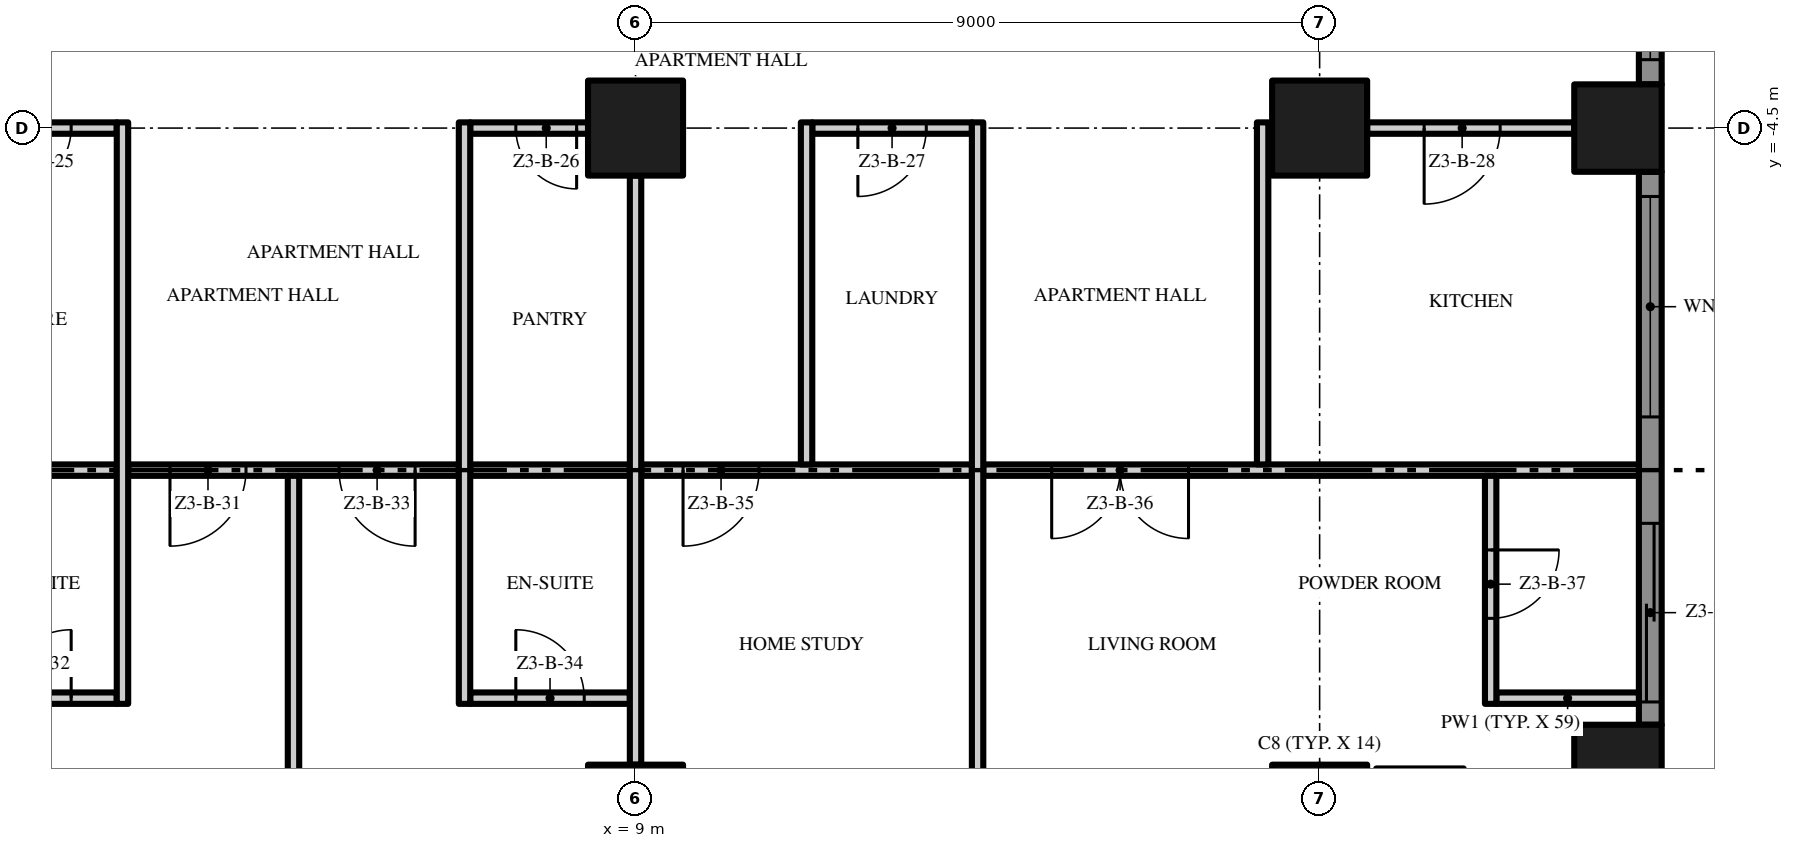
"""IFC4 building model, lengths in metres.
Left out: names, types, materials, properties, quantities, classifications, styles, units other than length and angle.
Written with IfcOpenShell. Run it as: python <this file> out.ifc"""

import sys

from ifc_helpers import new_model, si_unit, direction, frame, frame_2d, origin, origin_2d, place, context, subcontext, project, spatial, polyline, rectangle, outline, extrude, element, fill, save


model = new_model("IFC4")
c1 = context("Model", 3, precision=1e-05, world=origin(), true_north=direction((0.0, 1.0)))
c2 = subcontext(c1, "Body", "Model", "MODEL_VIEW")
j1 = project(units=[si_unit("LENGTHUNIT", "METRE"), si_unit("PLANEANGLEUNIT", "RADIAN")], contexts=[c1])
p1 = place(None, origin())
s1 = spatial("IfcSite", under=j1, at=p1, CompositionType="ELEMENT")
p2 = place(p1, origin())
s2 = spatial("IfcBuilding", under=s1, at=p2, CompositionType="ELEMENT")
p3 = place(p2, frame((0.0, 0.0, 144.0)))
s3 = spatial("IfcBuildingStorey", under=s2, at=p3, CompositionType="ELEMENT", Elevation=144.0)
for number, where, z_axis, x_axis in (
    (1, (18.0, -13.5, 0.0), (0.0, 0.0, 1.0), (1.0, 0.0, 0.0)),
    (2, (18.0, -4.5, 0.0), (0.0, 0.0, 1.0), (1.0, 0.0, 0.0)),
):
    element("IfcColumn", number, at=place(p3, frame(where, z_axis=z_axis, x_axis=x_axis)), inside=s3, PredefinedType="COLUMN", context=c2, shape_type="SweptSolid", body=[
        extrude(rectangle(XDim=1.25, YDim=1.25, at=origin_2d()), origin(), (0.0, 0.0, 1.0), 3.5),
    ])
for number, where, z_axis, x_axis in (
    (3, (21.925, -12.925, 0.0), (0.0, 0.0, 1.0), (1.0, 0.0, 0.0)),
    (4, (21.925, -4.5, 0.0), (0.0, 0.0, 1.0), (1.0, 0.0, 0.0)),
):
    element("IfcColumn", number, at=place(p3, frame(where, z_axis=z_axis, x_axis=x_axis)), inside=s3, PredefinedType="COLUMN", context=c2, shape_type="SweptSolid", body=[
        extrude(rectangle(XDim=1.15, YDim=1.15, at=origin_2d()), origin(), (0.0, 0.0, 1.0), 3.5),
    ])
for number, where, z_axis, x_axis in (
    (5, (9.0, -13.5, 0.0), (0.0, 0.0, 1.0), (1.0, 0.0, 0.0)),
    (6, (9.0, -4.5, 0.0), (0.0, 0.0, 1.0), (1.0, 0.0, 0.0)),
):
    element("IfcColumn", number, at=place(p3, frame(where, z_axis=z_axis, x_axis=x_axis)), inside=s3, PredefinedType="COLUMN", context=c2, shape_type="SweptSolid", body=[
        extrude(rectangle(XDim=1.25, YDim=1.25, at=origin_2d()), origin(), (0.0, 0.0, 1.0), 3.5),
    ])
p4 = place(p3, frame((22.35, -5.075, 0.0), z_axis=(0.0, 0.0, 1.0), x_axis=(0.0, -1.0, 0.0)))
e7 = element("IfcWall", 7, at=p4, inside=s3, PredefinedType="SOLIDWALL", context=c2, shape_type="SweptSolid", body=[
    extrude(rectangle(XDim=7.275, YDim=0.3, at=frame_2d((3.638, 0.0))), origin(), (0.0, 0.0, 1.0), 3.5),
])
p5 = place(p4, frame((4.625, 0.0, 0.0)))
e8 = element("IfcOpeningElement", 8, at=p5, cuts=e7, PredefinedType="OPENING", context=c2, shape_type="SweptSolid", body=[
    extrude(rectangle(XDim=2.35, YDim=2.4, at=frame_2d((1.175, 1.2))), frame((0.0, 0.16, 0.0), z_axis=(0.0, -1.0, 0.0), x_axis=(1.0, 0.0, 0.0)), (0.0, 0.0, 1.0), 0.32),
])
p6 = place(p4, frame((0.325, 0.0, 0.45)))
e9 = element("IfcOpeningElement", 9, at=p6, cuts=e7, PredefinedType="OPENING", context=c2, shape_type="SweptSolid", body=[
    extrude(rectangle(XDim=2.9, YDim=2.65, at=frame_2d((1.45, 1.325))), frame((0.0, 0.16, 0.0), z_axis=(0.0, -1.0, 0.0), x_axis=(1.0, 0.0, 0.0)), (0.0, 0.0, 1.0), 0.32),
])
p7 = place(p3, frame((22.35, 3.925, 0.0), z_axis=(0.0, 0.0, 1.0), x_axis=(0.0, -1.0, 0.0)))
e10 = element("IfcWall", 10, at=p7, inside=s3, PredefinedType="SOLIDWALL", context=c2, shape_type="SweptSolid", body=[
    extrude(rectangle(XDim=7.85, YDim=0.3, at=frame_2d((3.925, 0.0))), origin(), (0.0, 0.0, 1.0), 3.5),
])
p8 = place(p7, frame((4.625, 0.0, 0.45)))
e11 = element("IfcOpeningElement", 11, at=p8, cuts=e10, PredefinedType="OPENING", context=c2, shape_type="SweptSolid", body=[
    extrude(rectangle(XDim=2.9, YDim=2.65, at=frame_2d((1.45, 1.325))), frame((0.0, 0.16, 0.0), z_axis=(0.0, -1.0, 0.0), x_axis=(1.0, 0.0, 0.0)), (0.0, 0.0, 1.0), 0.32),
])
p9 = place(p7, frame((0.325, 0.0, 0.45)))
e12 = element("IfcOpeningElement", 12, at=p9, cuts=e10, PredefinedType="OPENING", context=c2, shape_type="SweptSolid", body=[
    extrude(rectangle(XDim=2.9, YDim=2.65, at=frame_2d((1.45, 1.325))), frame((0.0, 0.16, 0.0), z_axis=(0.0, -1.0, 0.0), x_axis=(1.0, 0.0, 0.0)), (0.0, 0.0, 1.0), 0.32),
])
p10 = place(p3, origin())
e13 = element("IfcWall", 13, at=p10, inside=s3, PredefinedType="USERDEFINED", context=c2, shape_type="SweptSolid", body=[
    extrude(outline(polyline([(24.3, -13.5), (25.005, -12.0), (25.441, -10.5), (25.5, -9.75), (25.441, -9.0), (25.005, -7.5), (24.3, -6.0), (23.595, -4.5), (23.159, -3.0), (23.1, -2.25), (23.159, -1.5), (23.595, 0.0), (24.3, 1.5), (25.005, 3.0), (25.441, 4.5), (25.5, 5.25), (25.441, 6.0), (25.005, 7.5), (24.3, 9.0), (23.595, 10.5), (23.159, 12.0), (23.1, 12.75), (23.159, 13.5), (23.595, 15.0), (24.3, 16.5), (25.005, 18.0), (24.779, 18.106), (24.074, 16.606), (23.36, 15.089), (22.911, 13.545), (22.849, 12.75), (22.911, 11.955), (23.36, 10.411), (24.074, 8.894), (24.771, 7.411), (25.194, 5.955), (25.249, 5.25), (25.194, 4.545), (24.771, 3.089), (24.074, 1.606), (23.36, 0.089), (22.911, -1.455), (22.849, -2.25), (22.911, -3.045), (23.36, -4.589), (24.074, -6.106), (24.771, -7.589), (25.194, -9.045), (25.249, -9.75), (25.194, -10.455), (24.771, -11.911), (24.074, -13.394), (24.3, -13.5)])), origin(), (0.0, 0.0, 1.0), 0.9),
])
p11 = place(p3, frame((0.075, -12.0, 0.0), z_axis=(0.0, 0.0, 1.0), x_axis=(1.0, 0.0, 0.0)))
e14 = element("IfcWall", 14, at=p11, inside=s3, PredefinedType="PARTITIONING", context=c2, shape_type="SweptSolid", body=[
    extrude(rectangle(XDim=2.1, YDim=0.15, at=frame_2d((1.05, 0.0))), origin(), (0.0, 0.0, 1.0), 3.5),
])
p12 = place(p11, frame((0.6, 0.0, 0.0)))
e15 = element("IfcOpeningElement", 15, at=p12, cuts=e14, PredefinedType="OPENING", context=c2, shape_type="SweptSolid", body=[
    extrude(rectangle(XDim=0.9, YDim=2.1, at=frame_2d((0.45, 1.05))), frame((0.0, 0.085, 0.0), z_axis=(0.0, -1.0, 0.0), x_axis=(1.0, 0.0, 0.0)), (0.0, 0.0, 1.0), 0.17),
])
p13 = place(p3, frame((6.825, -12.0, 0.0), z_axis=(0.0, 0.0, 1.0), x_axis=(1.0, 0.0, 0.0)))
e16 = element("IfcWall", 16, at=p13, inside=s3, PredefinedType="PARTITIONING", context=c2, shape_type="SweptSolid", body=[
    extrude(rectangle(XDim=2.1, YDim=0.15, at=frame_2d((1.05, 0.0))), origin(), (0.0, 0.0, 1.0), 3.5),
])
p14 = place(p13, frame((0.6, 0.0, 0.0)))
e17 = element("IfcOpeningElement", 17, at=p14, cuts=e16, PredefinedType="OPENING", context=c2, shape_type="SweptSolid", body=[
    extrude(rectangle(XDim=0.9, YDim=2.1, at=frame_2d((0.45, 1.05))), frame((0.0, 0.085, 0.0), z_axis=(0.0, -1.0, 0.0), x_axis=(1.0, 0.0, 0.0)), (0.0, 0.0, 1.0), 0.17),
])
p15 = place(p3, frame((20.325, -12.0, 0.0), z_axis=(0.0, 0.0, 1.0), x_axis=(1.0, 0.0, 0.0)))
e18 = element("IfcWall", 18, at=p15, inside=s3, PredefinedType="PARTITIONING", context=c2, shape_type="SweptSolid", body=[
    extrude(rectangle(XDim=1.875, YDim=0.15, at=frame_2d((0.938, 0.0))), origin(), (0.0, 0.0, 1.0), 3.5),
])
p16 = place(p3, frame((0.075, -9.0, 0.0), z_axis=(0.0, 0.0, 1.0), x_axis=(1.0, 0.0, 0.0)))
e19 = element("IfcWall", 19, at=p16, inside=s3, PredefinedType="PARTITIONING", context=c2, shape_type="SweptSolid", body=[
    extrude(rectangle(XDim=2.1, YDim=0.15, at=frame_2d((1.05, 0.0))), origin(), (0.0, 0.0, 1.0), 3.5),
])
p17 = place(p3, frame((6.675, -9.0, 0.0), z_axis=(0.0, 0.0, 1.0), x_axis=(-1.0, 0.0, 0.0)))
e20 = element("IfcWall", 20, at=p17, inside=s3, PredefinedType="PARTITIONING", context=c2, shape_type="SweptSolid", body=[
    extrude(rectangle(XDim=4.35, YDim=0.15, at=frame_2d((2.175, 0.0))), origin(), (0.0, 0.0, 1.0), 3.5),
])
p18 = place(p17, frame((2.8, 0.0, 0.0)))
e21 = element("IfcOpeningElement", 21, at=p18, cuts=e20, PredefinedType="OPENING", context=c2, shape_type="SweptSolid", body=[
    extrude(rectangle(XDim=1.0, YDim=2.4, at=frame_2d((0.5, 1.2))), frame((0.0, 0.085, 0.0), z_axis=(0.0, -1.0, 0.0), x_axis=(1.0, 0.0, 0.0)), (0.0, 0.0, 1.0), 0.17),
])
p19 = place(p17, frame((0.575, 0.0, 0.0)))
e22 = element("IfcOpeningElement", 22, at=p19, cuts=e20, PredefinedType="OPENING", context=c2, shape_type="SweptSolid", body=[
    extrude(rectangle(XDim=1.0, YDim=2.4, at=frame_2d((0.5, 1.2))), frame((0.0, 0.085, 0.0), z_axis=(0.0, -1.0, 0.0), x_axis=(1.0, 0.0, 0.0)), (0.0, 0.0, 1.0), 0.17),
])
p20 = place(p3, frame((6.825, -9.0, 0.0), z_axis=(0.0, 0.0, 1.0), x_axis=(1.0, 0.0, 0.0)))
e23 = element("IfcWall", 23, at=p20, inside=s3, PredefinedType="PARTITIONING", context=c2, shape_type="SweptSolid", body=[
    extrude(rectangle(XDim=2.1, YDim=0.15, at=frame_2d((1.05, 0.0))), origin(), (0.0, 0.0, 1.0), 3.5),
])
p21 = place(p3, frame((13.425, -9.0, 0.0), z_axis=(0.0, 0.0, 1.0), x_axis=(-1.0, 0.0, 0.0)))
e24 = element("IfcWall", 24, at=p21, inside=s3, PredefinedType="PARTITIONING", context=c2, shape_type="SweptSolid", body=[
    extrude(rectangle(XDim=4.35, YDim=0.15, at=frame_2d((2.175, 0.0))), origin(), (0.0, 0.0, 1.0), 3.5),
])
p22 = place(p21, frame((2.8, 0.0, 0.0)))
e25 = element("IfcOpeningElement", 25, at=p22, cuts=e24, PredefinedType="OPENING", context=c2, shape_type="SweptSolid", body=[
    extrude(rectangle(XDim=1.0, YDim=2.4, at=frame_2d((0.5, 1.2))), frame((0.0, 0.085, 0.0), z_axis=(0.0, -1.0, 0.0), x_axis=(1.0, 0.0, 0.0)), (0.0, 0.0, 1.0), 0.17),
])
p23 = place(p3, frame((22.2, -9.0, 0.0), z_axis=(0.0, 0.0, 1.0), x_axis=(-1.0, 0.0, 0.0)))
e26 = element("IfcWall", 26, at=p23, inside=s3, PredefinedType="PARTITIONING", context=c2, shape_type="SweptSolid", body=[
    extrude(rectangle(XDim=8.625, YDim=0.15, at=frame_2d((4.312, 0.0))), origin(), (0.0, 0.0, 1.0), 3.5),
])
p24 = place(p23, frame((5.925, 0.0, 0.0)))
e27 = element("IfcOpeningElement", 27, at=p24, cuts=e26, PredefinedType="OPENING", context=c2, shape_type="SweptSolid", body=[
    extrude(rectangle(XDim=1.8, YDim=2.4, at=frame_2d((0.9, 1.2))), frame((0.0, 0.085, 0.0), z_axis=(0.0, -1.0, 0.0), x_axis=(1.0, 0.0, 0.0)), (0.0, 0.0, 1.0), 0.17),
])
p25 = place(p3, frame((2.175, -4.5, 0.0), z_axis=(0.0, 0.0, 1.0), x_axis=(-1.0, 0.0, 0.0)))
e28 = element("IfcWall", 28, at=p25, inside=s3, PredefinedType="PARTITIONING", context=c2, shape_type="SweptSolid", body=[
    extrude(rectangle(XDim=1.55, YDim=0.15, at=frame_2d((0.775, 0.0))), origin(), (0.0, 0.0, 1.0), 3.5),
])
p26 = place(p25, frame((0.6, 0.0, 0.0)))
e29 = element("IfcOpeningElement", 29, at=p26, cuts=e28, PredefinedType="OPENING", context=c2, shape_type="SweptSolid", body=[
    extrude(rectangle(XDim=0.8, YDim=2.0, at=frame_2d((0.4, 1.0))), frame((0.0, 0.085, 0.0), z_axis=(0.0, -1.0, 0.0), x_axis=(1.0, 0.0, 0.0)), (0.0, 0.0, 1.0), 0.17),
])
p27 = place(p3, frame((8.375, -4.5, 0.0), z_axis=(0.0, 0.0, 1.0), x_axis=(-1.0, 0.0, 0.0)))
e30 = element("IfcWall", 30, at=p27, inside=s3, PredefinedType="PARTITIONING", context=c2, shape_type="SweptSolid", body=[
    extrude(rectangle(XDim=1.55, YDim=0.15, at=frame_2d((0.775, 0.0))), origin(), (0.0, 0.0, 1.0), 3.5),
])
p28 = place(p27, frame((0.15, 0.0, 0.0)))
e31 = element("IfcOpeningElement", 31, at=p28, cuts=e30, PredefinedType="OPENING", context=c2, shape_type="SweptSolid", body=[
    extrude(rectangle(XDim=0.8, YDim=2.0, at=frame_2d((0.4, 1.0))), frame((0.0, 0.085, 0.0), z_axis=(0.0, -1.0, 0.0), x_axis=(1.0, 0.0, 0.0)), (0.0, 0.0, 1.0), 0.17),
])
p29 = place(p3, frame((13.425, -4.5, 0.0), z_axis=(0.0, 0.0, 1.0), x_axis=(-1.0, 0.0, 0.0)))
e32 = element("IfcWall", 32, at=p29, inside=s3, PredefinedType="PARTITIONING", context=c2, shape_type="SweptSolid", body=[
    extrude(rectangle(XDim=2.1, YDim=0.15, at=frame_2d((1.05, 0.0))), origin(), (0.0, 0.0, 1.0), 3.5),
])
p30 = place(p29, frame((0.6, 0.0, 0.0)))
e33 = element("IfcOpeningElement", 33, at=p30, cuts=e32, PredefinedType="OPENING", context=c2, shape_type="SweptSolid", body=[
    extrude(rectangle(XDim=0.9, YDim=2.1, at=frame_2d((0.45, 1.05))), frame((0.0, 0.085, 0.0), z_axis=(0.0, -1.0, 0.0), x_axis=(1.0, 0.0, 0.0)), (0.0, 0.0, 1.0), 0.17),
])
p31 = place(p3, frame((21.35, -4.5, 0.0), z_axis=(0.0, 0.0, 1.0), x_axis=(-1.0, 0.0, 0.0)))
e34 = element("IfcWall", 34, at=p31, inside=s3, PredefinedType="PARTITIONING", context=c2, shape_type="SweptSolid", body=[
    extrude(rectangle(XDim=2.725, YDim=0.15, at=frame_2d((1.363, 0.0))), origin(), (0.0, 0.0, 1.0), 3.5),
])
p32 = place(p31, frame((0.975, 0.0, 0.0)))
e35 = element("IfcOpeningElement", 35, at=p32, cuts=e34, PredefinedType="OPENING", context=c2, shape_type="SweptSolid", body=[
    extrude(rectangle(XDim=1.0, YDim=2.4, at=frame_2d((0.5, 1.2))), frame((0.0, 0.085, 0.0), z_axis=(0.0, -1.0, 0.0), x_axis=(1.0, 0.0, 0.0)), (0.0, 0.0, 1.0), 0.17),
])
p33 = place(p3, frame((2.25, -12.075, 0.0), z_axis=(0.0, 0.0, 1.0), x_axis=(0.0, 1.0, 0.0)))
e36 = element("IfcWall", 36, at=p33, inside=s3, PredefinedType="PARTITIONING", context=c2, shape_type="SweptSolid", body=[
    extrude(rectangle(XDim=7.65, YDim=0.15, at=frame_2d((3.825, 0.0))), origin(), (0.0, 0.0, 1.0), 3.5),
])
p34 = place(p3, frame((4.5, -17.7, 0.0), z_axis=(0.0, 0.0, 1.0), x_axis=(0.0, 1.0, 0.0)))
e37 = element("IfcWall", 37, at=p34, inside=s3, PredefinedType="PARTITIONING", context=c2, shape_type="SweptSolid", body=[
    extrude(rectangle(XDim=8.625, YDim=0.15, at=frame_2d((4.312, 0.0))), origin(), (0.0, 0.0, 1.0), 3.5),
])
p35 = place(p3, frame((6.75, -12.075, 0.0), z_axis=(0.0, 0.0, 1.0), x_axis=(0.0, 1.0, 0.0)))
e38 = element("IfcWall", 38, at=p35, inside=s3, PredefinedType="PARTITIONING", context=c2, shape_type="SweptSolid", body=[
    extrude(rectangle(XDim=7.65, YDim=0.15, at=frame_2d((3.825, 0.0))), origin(), (0.0, 0.0, 1.0), 3.5),
])
p36 = place(p3, frame((9.0, -12.875, 0.0), z_axis=(0.0, 0.0, 1.0), x_axis=(0.0, 1.0, 0.0)))
e39 = element("IfcWall", 39, at=p36, inside=s3, PredefinedType="PARTITIONING", context=c2, shape_type="SweptSolid", body=[
    extrude(rectangle(XDim=7.75, YDim=0.15, at=frame_2d((3.875, 0.0))), origin(), (0.0, 0.0, 1.0), 3.5),
])
p37 = place(p3, frame((11.25, -8.925, 0.0), z_axis=(0.0, 0.0, 1.0), x_axis=(0.0, 1.0, 0.0)))
e40 = element("IfcWall", 40, at=p37, inside=s3, PredefinedType="PARTITIONING", context=c2, shape_type="SweptSolid", body=[
    extrude(rectangle(XDim=4.5, YDim=0.15, at=frame_2d((2.25, 0.0))), origin(), (0.0, 0.0, 1.0), 3.5),
])
p38 = place(p3, frame((13.5, -17.7, 0.0), z_axis=(0.0, 0.0, 1.0), x_axis=(0.0, 1.0, 0.0)))
e41 = element("IfcWall", 41, at=p38, inside=s3, PredefinedType="PARTITIONING", context=c2, shape_type="SweptSolid", body=[
    extrude(rectangle(XDim=13.275, YDim=0.15, at=frame_2d((6.638, 0.0))), origin(), (0.0, 0.0, 1.0), 3.5),
])
p39 = place(p3, frame((17.25, -8.925, 0.0), z_axis=(0.0, 0.0, 1.0), x_axis=(0.0, 1.0, 0.0)))
e42 = element("IfcWall", 42, at=p39, inside=s3, PredefinedType="PARTITIONING", context=c2, shape_type="SweptSolid", body=[
    extrude(rectangle(XDim=4.5, YDim=0.15, at=frame_2d((2.25, 0.0))), origin(), (0.0, 0.0, 1.0), 3.5),
])
p40 = place(p3, frame((20.25, -9.075, 0.0), z_axis=(0.0, 0.0, 1.0), x_axis=(0.0, -1.0, 0.0)))
e43 = element("IfcWall", 43, at=p40, inside=s3, PredefinedType="PARTITIONING", context=c2, shape_type="SweptSolid", body=[
    extrude(rectangle(XDim=3.0, YDim=0.15, at=frame_2d((1.5, 0.0))), origin(), (0.0, 0.0, 1.0), 3.5),
])
p41 = place(p40, frame((0.975, 0.0, 0.0)))
e44 = element("IfcOpeningElement", 44, at=p41, cuts=e43, PredefinedType="OPENING", context=c2, shape_type="SweptSolid", body=[
    extrude(rectangle(XDim=0.9, YDim=2.1, at=frame_2d((0.45, 1.05))), frame((0.0, 0.085, 0.0), z_axis=(0.0, -1.0, 0.0), x_axis=(1.0, 0.0, 0.0)), (0.0, 0.0, 1.0), 0.17),
])
p42 = place(p5, origin())
e45 = element("IfcDoor", 45, at=p42, inside=s3, OperationType="SINGLE_SWING_LEFT", PredefinedType="DOOR", context=c2, shape_type="SweptSolid", body=[
    extrude(rectangle(XDim=2.35, YDim=2.4, at=frame_2d((1.175, 1.2))), frame((0.0, 0.025, 0.0), z_axis=(0.0, -1.0, 0.0), x_axis=(1.0, 0.0, 0.0)), (0.0, 0.0, 1.0), 0.05),
])
fill(e8, e45)
p43 = place(p6, origin())
e46 = element("IfcWindow", 46, at=p43, inside=s3, PartitioningType="SINGLE_PANEL", PredefinedType="WINDOW", context=c2, shape_type="SweptSolid", body=[
    extrude(rectangle(XDim=2.9, YDim=2.65, at=frame_2d((1.45, 1.325))), frame((0.0, 0.03, 0.0), z_axis=(0.0, -1.0, 0.0), x_axis=(1.0, 0.0, 0.0)), (0.0, 0.0, 1.0), 0.06),
])
fill(e9, e46)
p44 = place(p8, origin())
e47 = element("IfcWindow", 47, at=p44, inside=s3, PartitioningType="SINGLE_PANEL", PredefinedType="WINDOW", context=c2, shape_type="SweptSolid", body=[
    extrude(rectangle(XDim=2.9, YDim=2.65, at=frame_2d((1.45, 1.325))), frame((0.0, 0.03, 0.0), z_axis=(0.0, -1.0, 0.0), x_axis=(1.0, 0.0, 0.0)), (0.0, 0.0, 1.0), 0.06),
])
fill(e11, e47)
p45 = place(p26, origin())
e48 = element("IfcDoor", 48, at=p45, inside=s3, OperationType="SINGLE_SWING_RIGHT", PredefinedType="DOOR", context=c2, shape_type="SweptSolid", body=[
    extrude(rectangle(XDim=0.8, YDim=2.0, at=frame_2d((0.4, 1.0))), frame((0.0, 0.025, 0.0), z_axis=(0.0, -1.0, 0.0), x_axis=(1.0, 0.0, 0.0)), (0.0, 0.0, 1.0), 0.05),
])
fill(e29, e48)
p46 = place(p28, origin())
e49 = element("IfcDoor", 49, at=p46, inside=s3, OperationType="SINGLE_SWING_LEFT", PredefinedType="DOOR", context=c2, shape_type="SweptSolid", body=[
    extrude(rectangle(XDim=0.8, YDim=2.0, at=frame_2d((0.4, 1.0))), frame((0.0, 0.025, 0.0), z_axis=(0.0, -1.0, 0.0), x_axis=(1.0, 0.0, 0.0)), (0.0, 0.0, 1.0), 0.05),
])
fill(e31, e49)
p47 = place(p30, origin())
e50 = element("IfcDoor", 50, at=p47, inside=s3, OperationType="SINGLE_SWING_RIGHT", PredefinedType="DOOR", context=c2, shape_type="SweptSolid", body=[
    extrude(rectangle(XDim=0.9, YDim=2.1, at=frame_2d((0.45, 1.05))), frame((0.0, 0.025, 0.0), z_axis=(0.0, -1.0, 0.0), x_axis=(1.0, 0.0, 0.0)), (0.0, 0.0, 1.0), 0.05),
])
fill(e33, e50)
p48 = place(p32, origin())
e51 = element("IfcDoor", 51, at=p48, inside=s3, OperationType="SINGLE_SWING_RIGHT", PredefinedType="DOOR", context=c2, shape_type="SweptSolid", body=[
    extrude(rectangle(XDim=1.0, YDim=2.4, at=frame_2d((0.5, 1.2))), frame((0.0, 0.025, 0.0), z_axis=(0.0, -1.0, 0.0), x_axis=(1.0, 0.0, 0.0)), (0.0, 0.0, 1.0), 0.05),
])
fill(e35, e51)
p49 = place(p18, origin())
e52 = element("IfcDoor", 52, at=p49, inside=s3, OperationType="SINGLE_SWING_RIGHT", PredefinedType="DOOR", context=c2, shape_type="SweptSolid", body=[
    extrude(rectangle(XDim=1.0, YDim=2.4, at=frame_2d((0.5, 1.2))), frame((0.0, 0.025, 0.0), z_axis=(0.0, -1.0, 0.0), x_axis=(1.0, 0.0, 0.0)), (0.0, 0.0, 1.0), 0.05),
])
fill(e21, e52)
p50 = place(p12, origin())
e53 = element("IfcDoor", 53, at=p50, inside=s3, OperationType="SINGLE_SWING_RIGHT", PredefinedType="DOOR", context=c2, shape_type="SweptSolid", body=[
    extrude(rectangle(XDim=0.9, YDim=2.1, at=frame_2d((0.45, 1.05))), frame((0.0, 0.025, 0.0), z_axis=(0.0, -1.0, 0.0), x_axis=(1.0, 0.0, 0.0)), (0.0, 0.0, 1.0), 0.05),
])
fill(e15, e53)
p51 = place(p19, origin())
e54 = element("IfcDoor", 54, at=p51, inside=s3, OperationType="SINGLE_SWING_LEFT", PredefinedType="DOOR", context=c2, shape_type="SweptSolid", body=[
    extrude(rectangle(XDim=1.0, YDim=2.4, at=frame_2d((0.5, 1.2))), frame((0.0, 0.025, 0.0), z_axis=(0.0, -1.0, 0.0), x_axis=(1.0, 0.0, 0.0)), (0.0, 0.0, 1.0), 0.05),
])
fill(e22, e54)
p52 = place(p14, origin())
e55 = element("IfcDoor", 55, at=p52, inside=s3, OperationType="SINGLE_SWING_LEFT", PredefinedType="DOOR", context=c2, shape_type="SweptSolid", body=[
    extrude(rectangle(XDim=0.9, YDim=2.1, at=frame_2d((0.45, 1.05))), frame((0.0, 0.025, 0.0), z_axis=(0.0, -1.0, 0.0), x_axis=(1.0, 0.0, 0.0)), (0.0, 0.0, 1.0), 0.05),
])
fill(e17, e55)
p53 = place(p22, origin())
e56 = element("IfcDoor", 56, at=p53, inside=s3, OperationType="SINGLE_SWING_RIGHT", PredefinedType="DOOR", context=c2, shape_type="SweptSolid", body=[
    extrude(rectangle(XDim=1.0, YDim=2.4, at=frame_2d((0.5, 1.2))), frame((0.0, 0.025, 0.0), z_axis=(0.0, -1.0, 0.0), x_axis=(1.0, 0.0, 0.0)), (0.0, 0.0, 1.0), 0.05),
])
fill(e25, e56)
p54 = place(p24, origin())
e57 = element("IfcDoor", 57, at=p54, inside=s3, OperationType="DOUBLE_DOOR_SINGLE_SWING", PredefinedType="DOOR", context=c2, shape_type="SweptSolid", body=[
    extrude(rectangle(XDim=1.8, YDim=2.4, at=frame_2d((0.9, 1.2))), frame((0.0, 0.025, 0.0), z_axis=(0.0, -1.0, 0.0), x_axis=(1.0, 0.0, 0.0)), (0.0, 0.0, 1.0), 0.05),
])
fill(e27, e57)
p55 = place(p41, origin())
e58 = element("IfcDoor", 58, at=p55, inside=s3, OperationType="SINGLE_SWING_LEFT", PredefinedType="DOOR", context=c2, shape_type="SweptSolid", body=[
    extrude(rectangle(XDim=0.9, YDim=2.1, at=frame_2d((0.45, 1.05))), frame((0.0, 0.025, 0.0), z_axis=(0.0, -1.0, 0.0), x_axis=(1.0, 0.0, 0.0)), (0.0, 0.0, 1.0), 0.05),
])
fill(e44, e58)
save(model, sys.argv[1])
